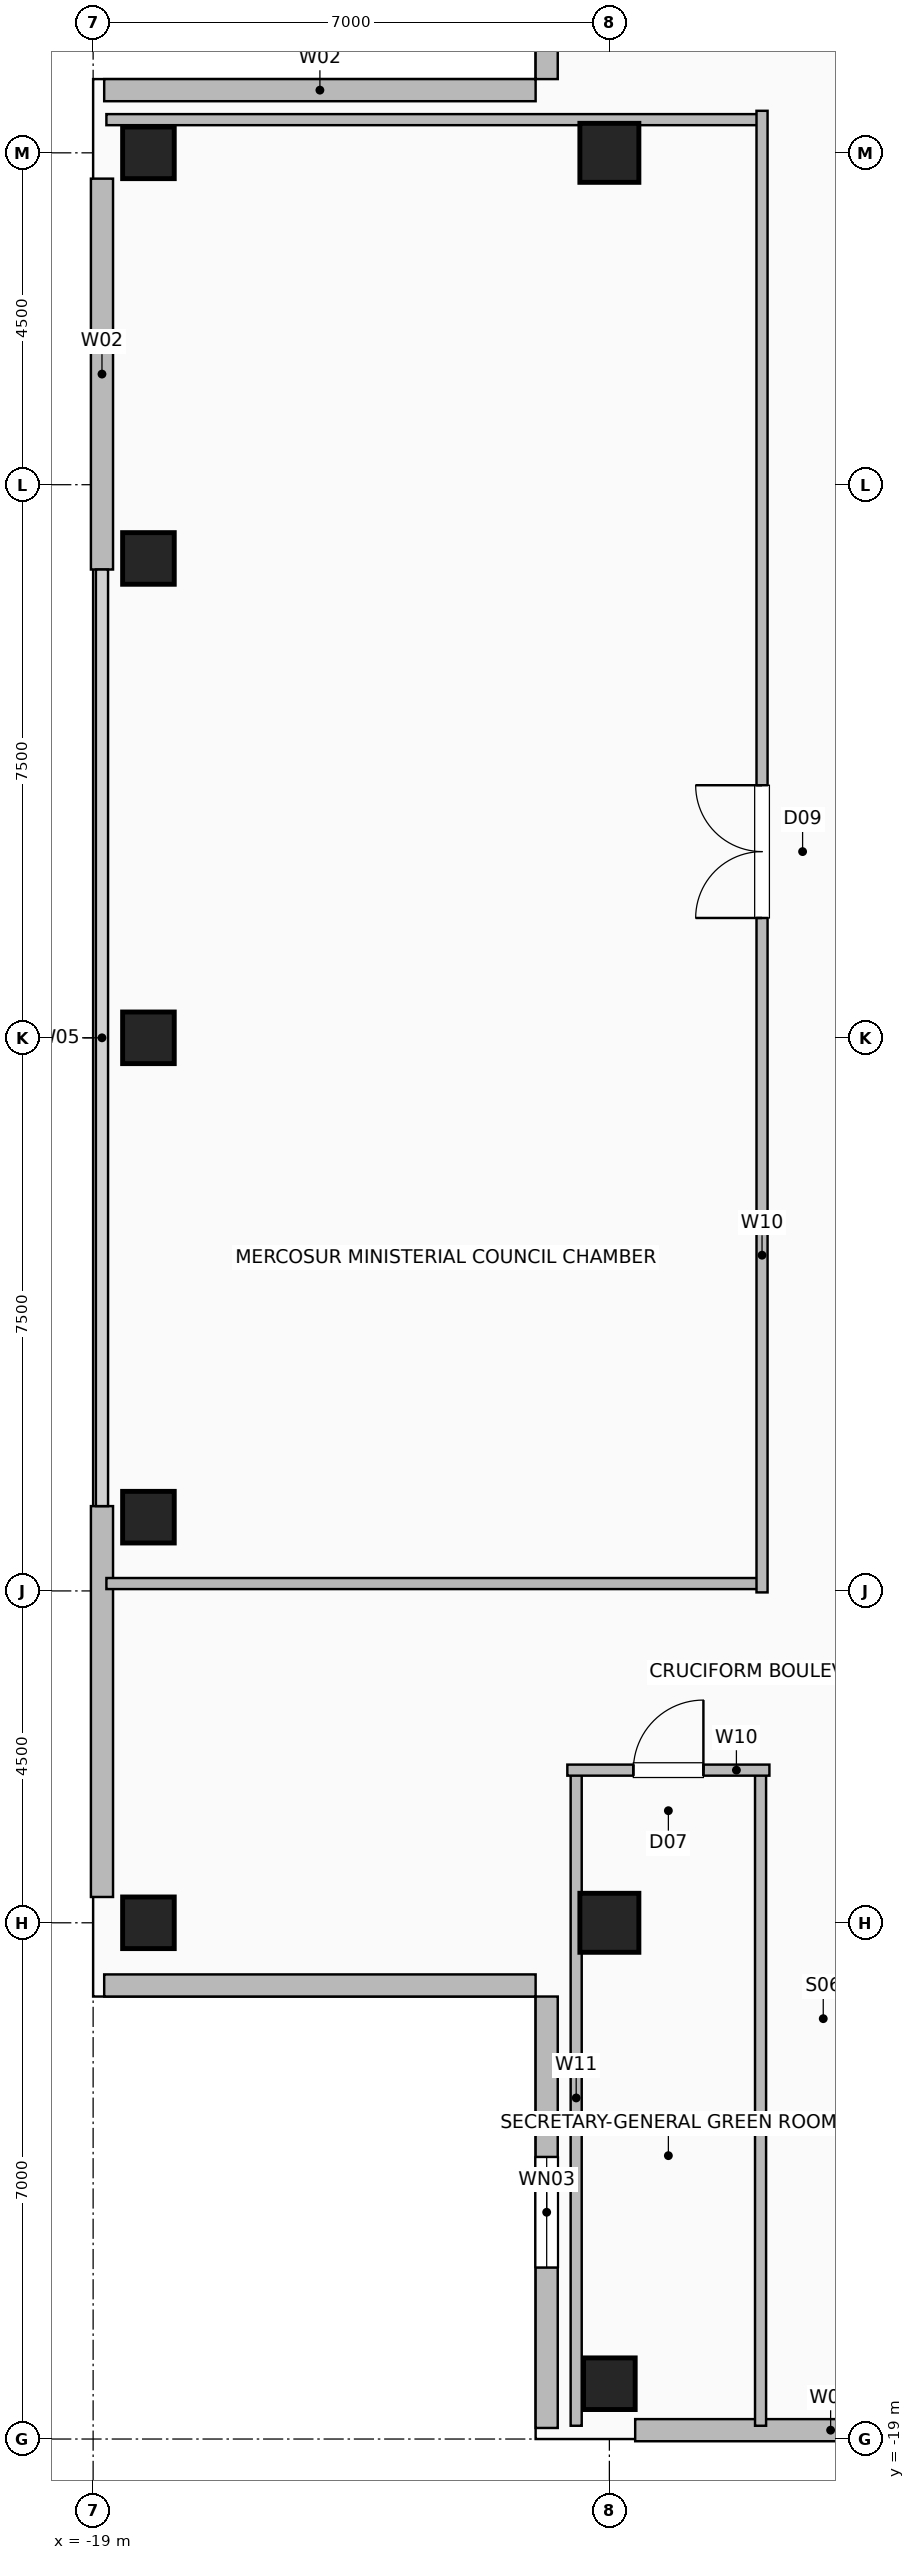
"""IFC4 building model, lengths in metres.
Left out: names, types, materials, properties, quantities, classifications, styles, units other than length and angle.
Written with IfcOpenShell. Run it as: python <this file> out.ifc"""

import sys

from ifc_helpers import new_model, si_unit, direction, frame, frame_2d, origin, origin_2d, place, context, subcontext, project, spatial, rectangle, hollow_rectangle, extrude, element, fill, save


model = new_model("IFC4")
c1 = context("Model", 3, precision=1e-05, world=origin(), true_north=direction((0.0, 1.0)))
c2 = subcontext(c1, "Body", "Model", "MODEL_VIEW")
j1 = project(units=[si_unit("LENGTHUNIT", "METRE"), si_unit("PLANEANGLEUNIT", "RADIAN")], contexts=[c1])
p1 = place(None, origin())
s1 = spatial("IfcSite", under=j1, at=p1, CompositionType="ELEMENT")
p2 = place(p1, origin())
s2 = spatial("IfcBuilding", under=s1, at=p2, CompositionType="ELEMENT")
p3 = place(p2, frame((0.0, 0.0, 246.8)))
s3 = spatial("IfcBuildingStorey", under=s2, at=p3, CompositionType="ELEMENT", Elevation=246.8)
for number, where, z_axis, x_axis in (
    (1, (-12.0, -18.25, 0.0), (0.0, 0.0, 1.0), (1.0, 0.0, 0.0)),
    (2, (-18.25, -12.0, 0.0), (0.0, 0.0, 1.0), (1.0, 0.0, 0.0)),
    (3, (-18.25, -6.5, 0.0), (0.0, 0.0, 1.0), (1.0, 0.0, 0.0)),
    (4, (-18.25, 0.0, 0.0), (0.0, 0.0, 1.0), (1.0, 0.0, 0.0)),
    (5, (-18.25, 6.5, 0.0), (0.0, 0.0, 1.0), (1.0, 0.0, 0.0)),
    (6, (-18.25, 12.0, 0.0), (0.0, 0.0, 1.0), (1.0, 0.0, 0.0)),
):
    element("IfcColumn", number, at=place(p3, frame(where, z_axis=z_axis, x_axis=x_axis)), inside=s3, PredefinedType="COLUMN", context=c2, shape_type="SweptSolid", body=[
        extrude(hollow_rectangle(XDim=0.7, YDim=0.7, WallThickness=0.035, at=origin_2d()), origin(), (0.0, 0.0, 1.0), 3.6),
    ])
for number, where, z_axis, x_axis in (
    (7, (-12.0, -12.0, 0.0), (0.0, 0.0, 1.0), (1.0, 0.0, 0.0)),
    (8, (-12.0, 12.0, 0.0), (0.0, 0.0, 1.0), (1.0, 0.0, 0.0)),
):
    element("IfcColumn", number, at=place(p3, frame(where, z_axis=z_axis, x_axis=x_axis)), inside=s3, PredefinedType="COLUMN", context=c2, shape_type="SweptSolid", body=[
        extrude(hollow_rectangle(XDim=0.8, YDim=0.8, WallThickness=0.04, at=origin_2d()), origin(), (0.0, 0.0, 1.0), 3.6),
    ])
for number, where, z_axis, x_axis in (
    (9, (-11.65, -18.88, 0.0), (0.0, 0.0, 1.0), (1.0, 0.0, 0.0)),
    (10, (-18.88, -11.65, 0.0), (0.0, 0.0, 1.0), (0.0, 1.0, 0.0)),
    (11, (-18.88, 6.35, 0.0), (0.0, 0.0, 1.0), (0.0, 1.0, 0.0)),
):
    element("IfcWall", number, at=place(p3, frame(where, z_axis=z_axis, x_axis=x_axis)), inside=s3, PredefinedType="SOLIDWALL", context=c2, shape_type="SweptSolid", body=[
        extrude(rectangle(XDim=5.3, YDim=0.3, at=frame_2d((2.65, 0.0))), origin(), (0.0, 0.0, 1.0), 3.36),
    ])
p4 = place(p3, frame((-12.85, -18.85, 0.0), z_axis=(0.0, 0.0, 1.0), x_axis=(0.0, 1.0, 0.0)))
e12 = element("IfcWall", 12, at=p4, inside=s3, PredefinedType="SOLIDWALL", context=c2, shape_type="SweptSolid", body=[
    extrude(rectangle(XDim=5.85, YDim=0.3, at=frame_2d((2.925, 0.0))), origin(), (0.0, 0.0, 1.0), 3.36),
])
p5 = place(p4, frame((2.175, 0.0, 0.9)))
e13 = element("IfcOpeningElement", 13, at=p5, cuts=e12, PredefinedType="OPENING", context=c2, shape_type="SweptSolid", body=[
    extrude(rectangle(XDim=1.5, YDim=1.8, at=frame_2d((0.75, 0.9))), frame((0.0, 0.16, 0.0), z_axis=(0.0, -1.0, 0.0), x_axis=(1.0, 0.0, 0.0)), (0.0, 0.0, 1.0), 0.32),
])
p6 = place(p3, frame((-18.85, -12.85, 0.0), z_axis=(0.0, 0.0, 1.0), x_axis=(1.0, 0.0, 0.0)))
e14 = element("IfcWall", 14, at=p6, inside=s3, PredefinedType="SOLIDWALL", context=c2, shape_type="SweptSolid", body=[
    extrude(rectangle(XDim=5.85, YDim=0.3, at=frame_2d((2.925, 0.0))), origin(), (0.0, 0.0, 1.0), 3.36),
])
p7 = place(p3, frame((-12.85, 18.85, 0.0), z_axis=(0.0, 0.0, 1.0), x_axis=(0.0, -1.0, 0.0)))
e15 = element("IfcWall", 15, at=p7, inside=s3, PredefinedType="SOLIDWALL", context=c2, shape_type="SweptSolid", body=[
    extrude(rectangle(XDim=5.85, YDim=0.3, at=frame_2d((2.925, 0.0))), origin(), (0.0, 0.0, 1.0), 3.36),
])
p8 = place(p7, frame((2.175, 0.0, 0.9)))
e16 = element("IfcOpeningElement", 16, at=p8, cuts=e15, PredefinedType="OPENING", context=c2, shape_type="SweptSolid", body=[
    extrude(rectangle(XDim=1.5, YDim=1.8, at=frame_2d((0.75, 0.9))), frame((0.0, 0.16, 0.0), z_axis=(0.0, -1.0, 0.0), x_axis=(1.0, 0.0, 0.0)), (0.0, 0.0, 1.0), 0.32),
])
p9 = place(p3, frame((-18.85, 12.85, 0.0), z_axis=(0.0, 0.0, 1.0), x_axis=(1.0, 0.0, 0.0)))
e17 = element("IfcWall", 17, at=p9, inside=s3, PredefinedType="SOLIDWALL", context=c2, shape_type="SweptSolid", body=[
    extrude(rectangle(XDim=5.85, YDim=0.3, at=frame_2d((2.925, 0.0))), origin(), (0.0, 0.0, 1.0), 3.36),
])
for number, where, z_axis, x_axis in (
    (18, (-12.45, -18.82, 0.0), (0.0, 0.0, 1.0), (0.0, 1.0, 0.0)),
    (19, (-9.95, -18.82, 0.0), (0.0, 0.0, 1.0), (0.0, 1.0, 0.0)),
):
    element("IfcWall", number, at=place(p3, frame(where, z_axis=z_axis, x_axis=x_axis)), inside=s3, PredefinedType="PARTITIONING", context=c2, shape_type="SweptSolid", body=[
        extrude(rectangle(XDim=8.89, YDim=0.15, at=frame_2d((4.445, 0.0))), origin(), (0.0, 0.0, 1.0), 3.36),
    ])
p10 = place(p3, frame((-12.57, -9.93, 0.0), z_axis=(0.0, 0.0, 1.0), x_axis=(1.0, 0.0, 0.0)))
e20 = element("IfcWall", 20, at=p10, inside=s3, PredefinedType="PARTITIONING", context=c2, shape_type="SweptSolid", body=[
    extrude(rectangle(XDim=2.74, YDim=0.15, at=frame_2d((1.37, 0.0))), origin(), (0.0, 0.0, 1.0), 3.36),
])
p11 = place(p10, frame((0.895, 0.0, 0.0)))
e21 = element("IfcOpeningElement", 21, at=p11, cuts=e20, PredefinedType="OPENING", context=c2, shape_type="SweptSolid", body=[
    extrude(rectangle(XDim=0.95, YDim=2.06, at=frame_2d((0.475, 1.03))), frame((0.0, 0.085, 0.0), z_axis=(0.0, -1.0, 0.0), x_axis=(1.0, 0.0, 0.0)), (0.0, 0.0, 1.0), 0.17),
])
for number, where, z_axis, x_axis in (
    (22, (-18.82, -7.4, 0.0), (0.0, 0.0, 1.0), (1.0, 0.0, 0.0)),
    (23, (-18.82, 12.45, 0.0), (0.0, 0.0, 1.0), (1.0, 0.0, 0.0)),
):
    element("IfcWall", number, at=place(p3, frame(where, z_axis=z_axis, x_axis=x_axis)), inside=s3, PredefinedType="PARTITIONING", context=c2, shape_type="SweptSolid", body=[
        extrude(rectangle(XDim=8.89, YDim=0.15, at=frame_2d((4.445, 0.0))), origin(), (0.0, 0.0, 1.0), 3.36),
    ])
p12 = place(p3, frame((-9.93, -7.52, 0.0), z_axis=(0.0, 0.0, 1.0), x_axis=(0.0, 1.0, 0.0)))
e24 = element("IfcWall", 24, at=p12, inside=s3, PredefinedType="PARTITIONING", context=c2, shape_type="SweptSolid", body=[
    extrude(rectangle(XDim=20.09, YDim=0.15, at=frame_2d((10.045, 0.0))), origin(), (0.0, 0.0, 1.0), 3.36),
])
p13 = place(p12, frame((9.145, 0.0, 0.0)))
e25 = element("IfcOpeningElement", 25, at=p13, cuts=e24, PredefinedType="OPENING", context=c2, shape_type="SweptSolid", body=[
    extrude(rectangle(XDim=1.8, YDim=2.08, at=frame_2d((0.9, 1.04))), frame((0.0, 0.085, 0.0), z_axis=(0.0, -1.0, 0.0), x_axis=(1.0, 0.0, 0.0)), (0.0, 0.0, 1.0), 0.17),
])
p14 = place(p5, origin())
e26 = element("IfcWindow", 26, at=p14, inside=s3, PartitioningType="SINGLE_PANEL", PredefinedType="WINDOW", context=c2, shape_type="SweptSolid", body=[
    extrude(rectangle(XDim=1.5, YDim=1.8, at=frame_2d((0.75, 0.9))), frame((0.0, 0.03, 0.0), z_axis=(0.0, -1.0, 0.0), x_axis=(1.0, 0.0, 0.0)), (0.0, 0.0, 1.0), 0.06),
])
fill(e13, e26)
p15 = place(p11, origin())
e27 = element("IfcDoor", 27, at=p15, inside=s3, OperationType="SINGLE_SWING_RIGHT", PredefinedType="DOOR", context=c2, shape_type="SweptSolid", body=[
    extrude(rectangle(XDim=0.95, YDim=2.06, at=frame_2d((0.475, 1.03))), frame((0.0, 0.025, 0.0), z_axis=(0.0, -1.0, 0.0), x_axis=(1.0, 0.0, 0.0)), (0.0, 0.0, 1.0), 0.05),
])
fill(e21, e27)
p16 = place(p13, origin())
e28 = element("IfcDoor", 28, at=p16, inside=s3, OperationType="DOUBLE_DOOR_SINGLE_SWING", PredefinedType="DOOR", context=c2, shape_type="SweptSolid", body=[
    extrude(rectangle(XDim=1.8, YDim=2.08, at=frame_2d((0.9, 1.04))), frame((0.0, 0.025, 0.0), z_axis=(0.0, -1.0, 0.0), x_axis=(1.0, 0.0, 0.0)), (0.0, 0.0, 1.0), 0.05),
])
fill(e25, e28)
save(model, sys.argv[1])
